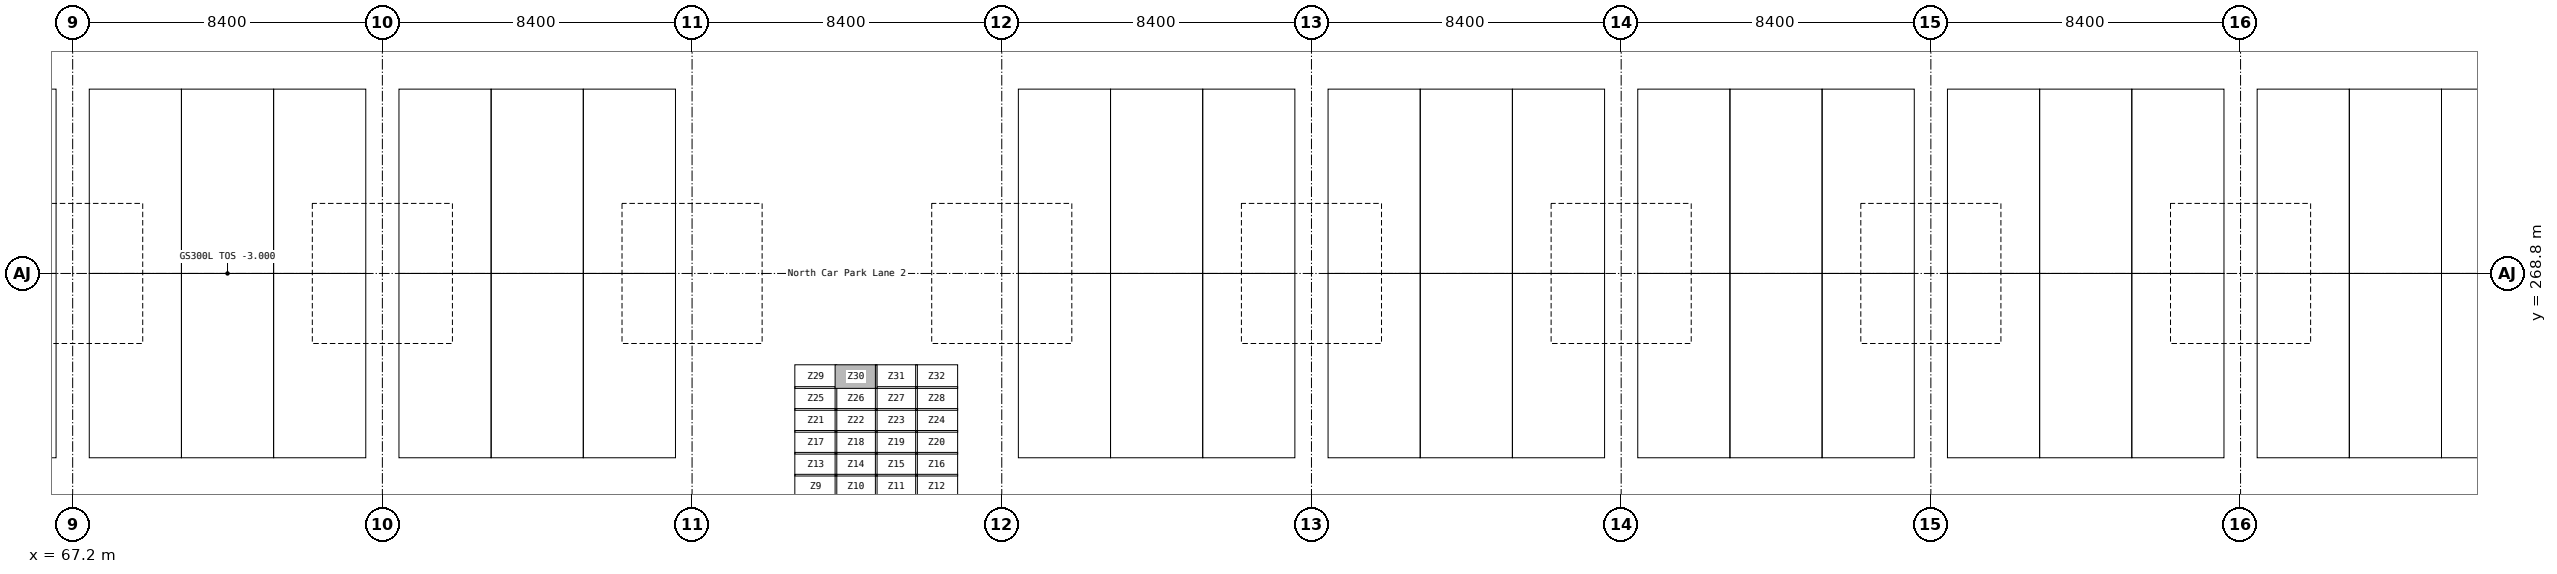
"""IFC4 building model, lengths in metres.
Left out: names, types, materials, properties, quantities, classifications, styles, units other than length and angle.
Written with IfcOpenShell. Run it as: python <this file> out.ifc"""

import sys

from ifc_helpers import new_model, si_unit, direction, frame, origin, origin_2d, place, context, subcontext, project, spatial, rectangle, extrude, element, save


model = new_model("IFC4")
c1 = context("Model", 3, precision=1e-05, world=origin(), true_north=direction((0.0, 1.0)))
c2 = subcontext(c1, "Body", "Model", "MODEL_VIEW")
j1 = project(units=[si_unit("LENGTHUNIT", "METRE"), si_unit("PLANEANGLEUNIT", "RADIAN")], contexts=[c1])
p1 = place(None, origin())
s1 = spatial("IfcSite", under=j1, at=p1, CompositionType="ELEMENT")
p2 = place(p1, origin())
s2 = spatial("IfcBuilding", under=s1, at=p2, CompositionType="ELEMENT")
p3 = place(p2, frame((0.0, 0.0, -3.0)))
s3 = spatial("IfcBuildingStorey", under=s2, at=p3, CompositionType="ELEMENT", Elevation=-3.0)
for number, where, z_axis, x_axis in (
    (1, (67.2, 268.8, 0.0), (0.0, 0.0, 1.0), (1.0, 0.0, 0.0)),
    (2, (75.6, 268.8, 0.0), (0.0, 0.0, 1.0), (1.0, 0.0, 0.0)),
    (3, (84.0, 268.8, 0.0), (0.0, 0.0, 1.0), (1.0, 0.0, 0.0)),
    (4, (92.4, 268.8, 0.0), (0.0, 0.0, 1.0), (1.0, 0.0, 0.0)),
    (5, (100.8, 268.8, 0.0), (0.0, 0.0, 1.0), (1.0, 0.0, 0.0)),
    (6, (109.2, 268.8, 0.0), (0.0, 0.0, 1.0), (1.0, 0.0, 0.0)),
    (7, (117.6, 268.8, 0.0), (0.0, 0.0, 1.0), (1.0, 0.0, 0.0)),
    (8, (126.0, 268.8, 0.0), (0.0, 0.0, 1.0), (1.0, 0.0, 0.0)),
):
    element("IfcColumn", number, at=place(p3, frame(where, z_axis=z_axis, x_axis=x_axis)), inside=s3, PredefinedType="COLUMN", context=c2, shape_type="SweptSolid", body=[
        extrude(rectangle(XDim=0.8, YDim=0.8, at=origin_2d()), origin(), (0.0, 0.0, 1.0), 2.4),
    ])
save(model, sys.argv[1])
